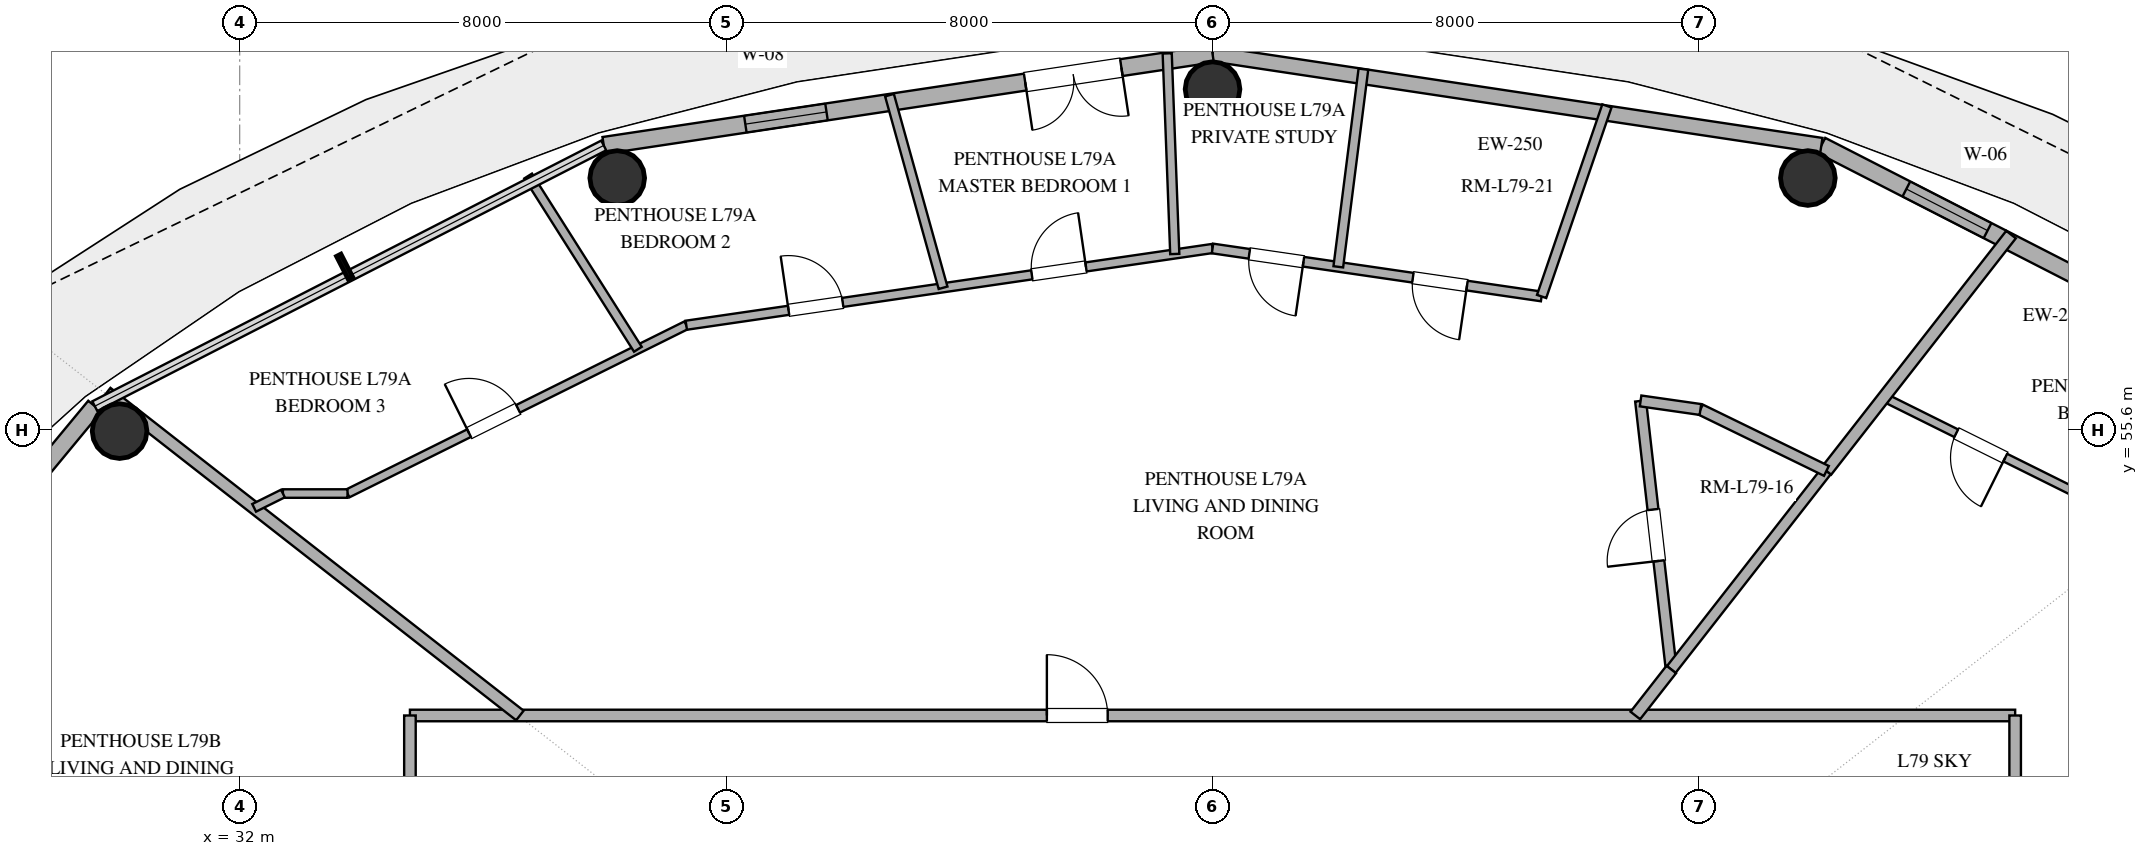
"""IFC4 building model, lengths in metres.
Left out: names, types, materials, properties, quantities, classifications, styles, units other than length and angle.
Written with IfcOpenShell. Run it as: python <this file> out.ifc"""

import sys

from ifc_helpers import new_model, si_unit, direction, frame, frame_2d, origin, origin_2d, place, context, subcontext, project, spatial, rectangle, hollow_circle, extrude, element, fill, save


model = new_model("IFC4")
c1 = context("Model", 3, precision=1e-05, world=origin(), true_north=direction((0.0, 1.0)))
c2 = subcontext(c1, "Body", "Model", "MODEL_VIEW")
j1 = project(units=[si_unit("LENGTHUNIT", "METRE"), si_unit("PLANEANGLEUNIT", "RADIAN")], contexts=[c1])
p1 = place(None, origin())
s1 = spatial("IfcSite", under=j1, at=p1, CompositionType="ELEMENT")
p2 = place(p1, origin())
s2 = spatial("IfcBuilding", under=s1, at=p2, CompositionType="ELEMENT")
p3 = place(p2, frame((0.0, 0.0, 305.4)))
s3 = spatial("IfcBuildingStorey", under=s2, at=p3, CompositionType="ELEMENT", Elevation=305.4)
for number, where, z_axis, x_axis in (
    (1, (57.791, 59.739, 0.0), (0.0, 0.0, 1.0), (1.0, 0.0, 0.0)),
    (2, (48.0, 61.2, 0.0), (0.0, 0.0, 1.0), (1.0, 0.0, 0.0)),
    (3, (38.209, 59.739, 0.0), (0.0, 0.0, 1.0), (1.0, 0.0, 0.0)),
    (4, (30.025, 55.576, 0.0), (0.0, 0.0, 1.0), (1.0, 0.0, 0.0)),
):
    element("IfcColumn", number, at=place(p3, frame(where, z_axis=z_axis, x_axis=x_axis)), inside=s3, PredefinedType="COLUMN", context=c2, shape_type="SweptSolid", body=[
        extrude(hollow_circle(Radius=0.45, WallThickness=0.025, at=origin_2d()), origin(), (0.0, 0.0, 1.0), 3.37),
    ])
p4 = place(p3, frame((66.383, 55.987, 0.0), z_axis=(0.0, 0.0, 1.0), x_axis=(-0.890007394051, 0.455946091699, 0.0)))
e5 = element("IfcWall", 5, at=p4, inside=s3, PredefinedType="SOLIDWALL", context=c2, shape_type="SweptSolid", body=[
    extrude(rectangle(XDim=9.404, YDim=0.28, at=frame_2d((4.702, 0.0))), origin(), (0.0, 0.0, 1.0), 3.37),
])
p5 = place(p4, frame((2.817, 0.0, 0.85)))
e6 = element("IfcOpeningElement", 6, at=p5, cuts=e5, PredefinedType="OPENING", context=c2, shape_type="SweptSolid", body=[
    extrude(rectangle(XDim=1.65, YDim=2.0, at=frame_2d((0.825, 1.0))), frame((0.0, 0.15, 0.0), z_axis=(0.0, -1.0, 0.0), x_axis=(1.0, 0.0, 0.0)), (0.0, 0.0, 1.0), 0.3),
])
p6 = place(p4, frame((6.333, 0.0, 0.85)))
e7 = element("IfcOpeningElement", 7, at=p6, cuts=e5, PredefinedType="OPENING", context=c2, shape_type="SweptSolid", body=[
    extrude(rectangle(XDim=1.5, YDim=2.0, at=frame_2d((0.75, 1.0))), frame((0.0, 0.15, 0.0), z_axis=(0.0, -1.0, 0.0), x_axis=(1.0, 0.0, 0.0)), (0.0, 0.0, 1.0), 0.3),
])
p7 = place(p3, frame((58.013, 60.274, 0.0), z_axis=(0.0, 0.0, 1.0), x_axis=(-0.988882522213, 0.148698881169, 0.0)))
e8 = element("IfcWall", 8, at=p7, inside=s3, PredefinedType="SOLIDWALL", context=c2, shape_type="SweptSolid", body=[
    extrude(rectangle(XDim=10.125, YDim=0.25, at=frame_2d((5.062, 0.0))), origin(), (0.0, 0.0, 1.0), 3.37),
])
p8 = place(p3, frame((48.0, 61.78, 0.0), z_axis=(0.0, 0.0, 1.0), x_axis=(-0.988882522213, -0.148698881169, 0.0)))
e9 = element("IfcWall", 9, at=p8, inside=s3, PredefinedType="SOLIDWALL", context=c2, shape_type="SweptSolid", body=[
    extrude(rectangle(XDim=10.125, YDim=0.28, at=frame_2d((5.062, 0.0))), origin(), (0.0, 0.0, 1.0), 3.37),
])
p9 = place(p8, frame((1.516, 0.0, 0.0)))
e10 = element("IfcOpeningElement", 10, at=p9, cuts=e9, PredefinedType="OPENING", context=c2, shape_type="SweptSolid", body=[
    extrude(rectangle(XDim=1.6, YDim=2.25, at=frame_2d((0.8, 1.125))), frame((0.0, 0.15, 0.0), z_axis=(0.0, -1.0, 0.0), x_axis=(1.0, 0.0, 0.0)), (0.0, 0.0, 1.0), 0.3),
])
p10 = place(p8, frame((6.42, 0.0, 0.85)))
e11 = element("IfcOpeningElement", 11, at=p10, cuts=e9, PredefinedType="OPENING", context=c2, shape_type="SweptSolid", body=[
    extrude(rectangle(XDim=1.35, YDim=1.8, at=frame_2d((0.675, 0.9))), frame((0.0, 0.15, 0.0), z_axis=(0.0, -1.0, 0.0), x_axis=(1.0, 0.0, 0.0)), (0.0, 0.0, 1.0), 0.3),
])
p11 = place(p3, frame((29.617, 55.987, 0.0), z_axis=(0.0, 0.0, 1.0), x_axis=(-0.63761509934, -0.770355103243, 0.0)))
e12 = element("IfcWall", 12, at=p11, inside=s3, PredefinedType="SOLIDWALL", context=c2, shape_type="SweptSolid", body=[
    extrude(rectangle(XDim=8.33, YDim=0.28, at=frame_2d((4.165, 0.0))), origin(), (0.0, 0.0, 1.0), 3.37),
])
p12 = place(p11, frame((2.426, 0.0, 0.85)))
e13 = element("IfcOpeningElement", 13, at=p12, cuts=e12, PredefinedType="OPENING", context=c2, shape_type="SweptSolid", body=[
    extrude(rectangle(XDim=1.2, YDim=1.8, at=frame_2d((0.6, 0.9))), frame((0.0, 0.15, 0.0), z_axis=(0.0, -1.0, 0.0), x_axis=(1.0, 0.0, 0.0)), (0.0, 0.0, 1.0), 0.3),
])
p13 = place(p11, frame((4.596, 0.0, 0.85)))
e14 = element("IfcOpeningElement", 14, at=p13, cuts=e12, PredefinedType="OPENING", context=c2, shape_type="SweptSolid", body=[
    extrude(rectangle(XDim=1.2, YDim=1.8, at=frame_2d((0.6, 0.9))), frame((0.0, 0.15, 0.0), z_axis=(0.0, -1.0, 0.0), x_axis=(1.0, 0.0, 0.0)), (0.0, 0.0, 1.0), 0.3),
])
p14 = place(p3, frame((34.8, 50.9, 0.0), z_axis=(0.0, 0.0, 1.0), x_axis=(1.0, 0.0, 0.0)))
e15 = element("IfcWall", 15, at=p14, inside=s3, PredefinedType="PARTITIONING", context=c2, shape_type="SweptSolid", body=[
    extrude(rectangle(XDim=26.4, YDim=0.19, at=frame_2d((13.2, 0.0))), origin(), (0.0, 0.0, 1.0), 2.73),
])
p15 = place(p14, frame((10.475, 0.0, 0.0)))
e16 = element("IfcOpeningElement", 16, at=p15, cuts=e15, PredefinedType="OPENING", context=c2, shape_type="SweptSolid", body=[
    extrude(rectangle(XDim=1.0, YDim=2.2, at=frame_2d((0.5, 1.1))), frame((0.0, 0.105, 0.0), z_axis=(0.0, -1.0, 0.0), x_axis=(1.0, 0.0, 0.0)), (0.0, 0.0, 1.0), 0.21),
])
p16 = place(p3, frame((61.2, 50.9, 0.0), z_axis=(0.0, 0.0, 1.0), x_axis=(0.0, -1.0, 0.0)))
e17 = element("IfcWall", 17, at=p16, inside=s3, PredefinedType="PARTITIONING", context=c2, shape_type="SweptSolid", body=[
    extrude(rectangle(XDim=16.885, YDim=0.19, at=frame_2d((8.442, 0.0))), origin(), (0.0, 0.0, 1.0), 2.73),
])
p17 = place(p16, frame((7.942, 0.0, 0.0)))
e18 = element("IfcOpeningElement", 18, at=p17, cuts=e17, PredefinedType="OPENING", context=c2, shape_type="SweptSolid", body=[
    extrude(rectangle(XDim=1.0, YDim=2.2, at=frame_2d((0.5, 1.1))), frame((0.0, 0.105, 0.0), z_axis=(0.0, -1.0, 0.0), x_axis=(1.0, 0.0, 0.0)), (0.0, 0.0, 1.0), 0.21),
])
p18 = place(p3, frame((34.8, 37.663, 0.0), z_axis=(0.0, 0.0, 1.0), x_axis=(0.0, 1.0, 0.0)))
e19 = element("IfcWall", 19, at=p18, inside=s3, PredefinedType="PARTITIONING", context=c2, shape_type="SweptSolid", body=[
    extrude(rectangle(XDim=13.237, YDim=0.19, at=frame_2d((6.618, 0.0))), origin(), (0.0, 0.0, 1.0), 2.73),
])
p19 = place(p18, frame((7.46, 0.0, 0.0)))
e20 = element("IfcOpeningElement", 20, at=p19, cuts=e19, PredefinedType="OPENING", context=c2, shape_type="SweptSolid", body=[
    extrude(rectangle(XDim=1.0, YDim=2.2, at=frame_2d((0.5, 1.1))), frame((0.0, 0.105, 0.0), z_axis=(0.0, -1.0, 0.0), x_axis=(1.0, 0.0, 0.0)), (0.0, 0.0, 1.0), 0.21),
])
p20 = place(p3, frame((36.608, 50.9, 0.0), z_axis=(0.0, 0.0, 1.0), x_axis=(-0.78801493083, 0.615656128686, 0.0)))
e21 = element("IfcWall", 21, at=p20, inside=s3, PredefinedType="PARTITIONING", context=c2, shape_type="SweptSolid", body=[
    extrude(rectangle(XDim=8.624, YDim=0.2, at=frame_2d((4.312, 0.0))), origin(), (0.0, 0.0, 1.0), 2.73),
])
p21 = place(p3, frame((33.773, 54.55, 0.0), z_axis=(0.0, 0.0, 1.0), x_axis=(0.895593510097, 0.44487331306, 0.0)))
e22 = element("IfcWall", 22, at=p21, inside=s3, PredefinedType="PARTITIONING", context=c2, shape_type="SweptSolid", body=[
    extrude(rectangle(XDim=6.222, YDim=0.14, at=frame_2d((3.111, 0.0))), origin(), (0.0, 0.0, 1.0), 2.73),
])
p22 = place(p21, frame((2.232, 0.0, 0.0)))
e23 = element("IfcOpeningElement", 23, at=p22, cuts=e22, PredefinedType="OPENING", context=c2, shape_type="SweptSolid", body=[
    extrude(rectangle(XDim=0.9, YDim=2.1, at=frame_2d((0.45, 1.05))), frame((0.0, 0.08, 0.0), z_axis=(0.0, -1.0, 0.0), x_axis=(1.0, 0.0, 0.0)), (0.0, 0.0, 1.0), 0.16),
])
p23 = place(p3, frame((55.544, 51.656, 0.0), z_axis=(0.0, 0.0, 1.0), x_axis=(-0.113517162422, 0.993536035499, 0.0)))
e24 = element("IfcWall", 24, at=p23, inside=s3, PredefinedType="PLUMBINGWALL", context=c2, shape_type="SweptSolid", body=[
    extrude(rectangle(XDim=4.446, YDim=0.18, at=frame_2d((2.223, 0.0))), origin(), (0.0, 0.0, 1.0), 2.73),
])
p24 = place(p23, frame((1.798, 0.0, 0.0)))
e25 = element("IfcOpeningElement", 25, at=p24, cuts=e24, PredefinedType="OPENING", context=c2, shape_type="SweptSolid", body=[
    extrude(rectangle(XDim=0.85, YDim=2.1, at=frame_2d((0.425, 1.05))), frame((0.0, 0.1, 0.0), z_axis=(0.0, -1.0, 0.0), x_axis=(1.0, 0.0, 0.0)), (0.0, 0.0, 1.0), 0.2),
])
p25 = place(p3, frame((39.345, 57.318, 0.0), z_axis=(0.0, 0.0, 1.0), x_axis=(0.989532150642, 0.144312587273, 0.0)))
e26 = element("IfcWall", 26, at=p25, inside=s3, PredefinedType="PARTITIONING", context=c2, shape_type="SweptSolid", body=[
    extrude(rectangle(XDim=8.746, YDim=0.15, at=frame_2d((4.373, 0.0))), origin(), (0.0, 0.0, 1.0), 2.73),
])
p26 = place(p25, frame((1.7, 0.0, 0.0)))
e27 = element("IfcOpeningElement", 27, at=p26, cuts=e26, PredefinedType="OPENING", context=c2, shape_type="SweptSolid", body=[
    extrude(rectangle(XDim=0.9, YDim=2.1, at=frame_2d((0.45, 1.05))), frame((0.0, 0.085, 0.0), z_axis=(0.0, -1.0, 0.0), x_axis=(1.0, 0.0, 0.0)), (0.0, 0.0, 1.0), 0.17),
])
p27 = place(p25, frame((5.743, 0.0, 0.0)))
e28 = element("IfcOpeningElement", 28, at=p27, cuts=e26, PredefinedType="OPENING", context=c2, shape_type="SweptSolid", body=[
    extrude(rectangle(XDim=0.9, YDim=2.1, at=frame_2d((0.45, 1.05))), frame((0.0, 0.085, 0.0), z_axis=(0.0, -1.0, 0.0), x_axis=(1.0, 0.0, 0.0)), (0.0, 0.0, 1.0), 0.17),
])
p28 = place(p3, frame((58.096, 54.922, 0.0), z_axis=(0.0, 0.0, 1.0), x_axis=(-0.615652044057, -0.788018122031, 0.0)))
e29 = element("IfcWall", 29, at=p28, inside=s3, PredefinedType="PLUMBINGWALL", context=c2, shape_type="SweptSolid", body=[
    extrude(rectangle(XDim=4.144, YDim=0.18, at=frame_2d((2.072, 0.0))), origin(), (0.0, 0.0, 1.0), 2.73),
])
p29 = place(p3, frame((62.227, 54.55, 0.0), z_axis=(0.0, 0.0, 1.0), x_axis=(-0.895591084679, 0.444878195739, 0.0)))
e30 = element("IfcWall", 30, at=p29, inside=s3, PredefinedType="PARTITIONING", context=c2, shape_type="SweptSolid", body=[
    extrude(rectangle(XDim=3.557, YDim=0.14, at=frame_2d((1.778, 0.0))), origin(), (0.0, 0.0, 1.0), 2.73),
])
p30 = place(p29, frame((1.328, 0.0, 0.0)))
e31 = element("IfcOpeningElement", 31, at=p30, cuts=e30, PredefinedType="OPENING", context=c2, shape_type="SweptSolid", body=[
    extrude(rectangle(XDim=0.9, YDim=2.1, at=frame_2d((0.45, 1.05))), frame((0.0, 0.08, 0.0), z_axis=(0.0, -1.0, 0.0), x_axis=(1.0, 0.0, 0.0)), (0.0, 0.0, 1.0), 0.16),
])
p31 = place(p3, frame((58.096, 54.922, 0.0), z_axis=(0.0, 0.0, 1.0), x_axis=(0.615676703635, 0.78799885571, 0.0)))
e32 = element("IfcWall", 32, at=p31, inside=s3, PredefinedType="PARTITIONING", context=c2, shape_type="SweptSolid", body=[
    extrude(rectangle(XDim=4.932, YDim=0.2, at=frame_2d((2.466, 0.0))), origin(), (0.0, 0.0, 1.0), 2.73),
])
p32 = place(p3, frame((53.412, 57.791, 0.0), z_axis=(0.0, 0.0, 1.0), x_axis=(-0.989530988967, 0.144320552503, 0.0)))
e33 = element("IfcWall", 33, at=p32, inside=s3, PredefinedType="PLUMBINGWALL", context=c2, shape_type="SweptSolid", body=[
    extrude(rectangle(XDim=5.469, YDim=0.16, at=frame_2d((2.735, 0.0))), origin(), (0.0, 0.0, 1.0), 2.73),
])
p33 = place(p32, frame((1.24, 0.0, 0.0)))
e34 = element("IfcOpeningElement", 34, at=p33, cuts=e33, PredefinedType="OPENING", context=c2, shape_type="SweptSolid", body=[
    extrude(rectangle(XDim=0.9, YDim=2.1, at=frame_2d((0.45, 1.05))), frame((0.0, 0.09, 0.0), z_axis=(0.0, -1.0, 0.0), x_axis=(1.0, 0.0, 0.0)), (0.0, 0.0, 1.0), 0.18),
])
p34 = place(p32, frame((3.958, 0.0, 0.0)))
e35 = element("IfcOpeningElement", 35, at=p34, cuts=e33, PredefinedType="OPENING", context=c2, shape_type="SweptSolid", body=[
    extrude(rectangle(XDim=0.9, YDim=2.1, at=frame_2d((0.45, 1.05))), frame((0.0, 0.09, 0.0), z_axis=(0.0, -1.0, 0.0), x_axis=(1.0, 0.0, 0.0)), (0.0, 0.0, 1.0), 0.18),
])
p35 = place(p3, frame((38.549, 56.922, 0.0), z_axis=(0.0, 0.0, 1.0), x_axis=(-0.535019359821, 0.844839798197, 0.0)))
e36 = element("IfcWall", 36, at=p35, inside=s3, PredefinedType="PARTITIONING", context=c2, shape_type="SweptSolid", body=[
    extrude(rectangle(XDim=3.373, YDim=0.15, at=frame_2d((1.686, 0.0))), origin(), (0.0, 0.0, 1.0), 2.73),
])
p36 = place(p3, frame((54.486, 60.924, 0.0), z_axis=(0.0, 0.0, 1.0), x_axis=(-0.324177330806, -0.945996330961, 0.0)))
e37 = element("IfcWall", 37, at=p36, inside=s3, PredefinedType="PLUMBINGWALL", context=c2, shape_type="SweptSolid", body=[
    extrude(rectangle(XDim=3.312, YDim=0.16, at=frame_2d((1.656, 0.0))), origin(), (0.0, 0.0, 1.0), 2.73),
])
p37 = place(p3, frame((47.379, 58.49, 0.0), z_axis=(0.0, 0.0, 1.0), x_axis=(-0.037643519601, 0.99929123154, 0.0)))
e38 = element("IfcWall", 38, at=p37, inside=s3, PredefinedType="PARTITIONING", context=c2, shape_type="SweptSolid", body=[
    extrude(rectangle(XDim=3.301, YDim=0.15, at=frame_2d((1.651, 0.0))), origin(), (0.0, 0.0, 1.0), 2.73),
])
p38 = place(p3, frame((43.568, 57.934, 0.0), z_axis=(0.0, 0.0, 1.0), x_axis=(-0.267957857452, 0.963430634052, 0.0)))
e39 = element("IfcWall", 39, at=p38, inside=s3, PredefinedType="PARTITIONING", context=c2, shape_type="SweptSolid", body=[
    extrude(rectangle(XDim=3.288, YDim=0.15, at=frame_2d((1.644, 0.0))), origin(), (0.0, 0.0, 1.0), 2.73),
])
p39 = place(p3, frame((50.481, 61.528, 0.0), z_axis=(0.0, 0.0, 1.0), x_axis=(-0.1260156089, -0.992028258828, 0.0)))
e40 = element("IfcWall", 40, at=p39, inside=s3, PredefinedType="PLUMBINGWALL", context=c2, shape_type="SweptSolid", body=[
    extrude(rectangle(XDim=3.276, YDim=0.16, at=frame_2d((1.638, 0.0))), origin(), (0.0, 0.0, 1.0), 2.73),
])
p40 = place(p3, frame((56.024, 55.932, 0.0), z_axis=(0.0, 0.0, 1.0), x_axis=(0.898893612682, -0.438166946585, 0.0)))
e41 = element("IfcWall", 41, at=p40, inside=s3, PredefinedType="PLUMBINGWALL", context=c2, shape_type="SweptSolid", body=[
    extrude(rectangle(XDim=2.305, YDim=0.18, at=frame_2d((1.153, 0.0))), origin(), (0.0, 0.0, 1.0), 2.73),
])
p41 = place(p3, frame((32.711, 54.55, 0.0), z_axis=(0.0, 0.0, 1.0), x_axis=(1.0, 0.0, 0.0)))
e42 = element("IfcWall", 42, at=p41, inside=s3, PredefinedType="PARTITIONING", context=c2, shape_type="SweptSolid", body=[
    extrude(rectangle(XDim=1.062, YDim=0.14, at=frame_2d((0.531, 0.0))), origin(), (0.0, 0.0, 1.0), 2.73),
])
p42 = place(p3, frame((55.04, 56.073, 0.0), z_axis=(0.0, 0.0, 1.0), x_axis=(0.989910163558, -0.141696394039, 0.0)))
e43 = element("IfcWall", 43, at=p42, inside=s3, PredefinedType="PLUMBINGWALL", context=c2, shape_type="SweptSolid", body=[
    extrude(rectangle(XDim=0.994, YDim=0.18, at=frame_2d((0.497, 0.0))), origin(), (0.0, 0.0, 1.0), 2.73),
])
p43 = place(p3, frame((55.544, 51.656, 0.0), z_axis=(0.0, 0.0, 1.0), x_axis=(-0.615752619539, -0.787939535453, 0.0)))
e44 = element("IfcWall", 44, at=p43, inside=s3, PredefinedType="PARTITIONING", context=c2, shape_type="SweptSolid", body=[
    extrude(rectangle(XDim=0.96, YDim=0.2, at=frame_2d((0.48, 0.0))), origin(), (0.0, 0.0, 1.0), 2.73),
])
p44 = place(p3, frame((32.238, 54.315, 0.0), z_axis=(0.0, 0.0, 1.0), x_axis=(0.895257581236, 0.445548945953, 0.0)))
e45 = element("IfcWall", 45, at=p44, inside=s3, PredefinedType="PARTITIONING", context=c2, shape_type="SweptSolid", body=[
    extrude(rectangle(XDim=0.528, YDim=0.14, at=frame_2d((0.264, 0.0))), origin(), (0.0, 0.0, 1.0), 2.73),
])
p45 = place(p6, origin())
e46 = element("IfcWindow", 46, at=p45, inside=s3, PartitioningType="SINGLE_PANEL", PredefinedType="WINDOW", context=c2, shape_type="SweptSolid", body=[
    extrude(rectangle(XDim=1.5, YDim=2.0, at=frame_2d((0.75, 1.0))), frame((0.0, 0.03, 0.0), z_axis=(0.0, -1.0, 0.0), x_axis=(1.0, 0.0, 0.0)), (0.0, 0.0, 1.0), 0.06),
])
fill(e7, e46)
p46 = place(p9, origin())
e47 = element("IfcDoor", 47, at=p46, inside=s3, OperationType="DOUBLE_DOOR_SINGLE_SWING", PredefinedType="DOOR", context=c2, shape_type="SweptSolid", body=[
    extrude(rectangle(XDim=1.6, YDim=2.25, at=frame_2d((0.8, 1.125))), frame((0.0, 0.025, 0.0), z_axis=(0.0, -1.0, 0.0), x_axis=(1.0, 0.0, 0.0)), (0.0, 0.0, 1.0), 0.05),
])
fill(e10, e47)
p47 = place(p10, origin())
e48 = element("IfcWindow", 48, at=p47, inside=s3, PartitioningType="SINGLE_PANEL", PredefinedType="WINDOW", context=c2, shape_type="SweptSolid", body=[
    extrude(rectangle(XDim=1.35, YDim=1.8, at=frame_2d((0.675, 0.9))), frame((0.0, 0.03, 0.0), z_axis=(0.0, -1.0, 0.0), x_axis=(1.0, 0.0, 0.0)), (0.0, 0.0, 1.0), 0.06),
])
fill(e11, e48)
p48 = place(p15, origin())
e49 = element("IfcDoor", 49, at=p48, inside=s3, OperationType="SINGLE_SWING_LEFT", PredefinedType="DOOR", context=c2, shape_type="SweptSolid", body=[
    extrude(rectangle(XDim=1.0, YDim=2.2, at=frame_2d((0.5, 1.1))), frame((0.0, 0.025, 0.0), z_axis=(0.0, -1.0, 0.0), x_axis=(1.0, 0.0, 0.0)), (0.0, 0.0, 1.0), 0.05),
])
fill(e16, e49)
p49 = place(p22, origin())
e50 = element("IfcDoor", 50, at=p49, inside=s3, OperationType="SINGLE_SWING_LEFT", PredefinedType="DOOR", context=c2, shape_type="SweptSolid", body=[
    extrude(rectangle(XDim=0.9, YDim=2.1, at=frame_2d((0.45, 1.05))), frame((0.0, 0.025, 0.0), z_axis=(0.0, -1.0, 0.0), x_axis=(1.0, 0.0, 0.0)), (0.0, 0.0, 1.0), 0.05),
])
fill(e23, e50)
p50 = place(p24, origin())
e51 = element("IfcDoor", 51, at=p50, inside=s3, OperationType="SINGLE_SWING_LEFT", PredefinedType="DOOR", context=c2, shape_type="SweptSolid", body=[
    extrude(rectangle(XDim=0.85, YDim=2.1, at=frame_2d((0.425, 1.05))), frame((0.0, 0.025, 0.0), z_axis=(0.0, -1.0, 0.0), x_axis=(1.0, 0.0, 0.0)), (0.0, 0.0, 1.0), 0.05),
])
fill(e25, e51)
p51 = place(p26, origin())
e52 = element("IfcDoor", 52, at=p51, inside=s3, OperationType="SINGLE_SWING_LEFT", PredefinedType="DOOR", context=c2, shape_type="SweptSolid", body=[
    extrude(rectangle(XDim=0.9, YDim=2.1, at=frame_2d((0.45, 1.05))), frame((0.0, 0.025, 0.0), z_axis=(0.0, -1.0, 0.0), x_axis=(1.0, 0.0, 0.0)), (0.0, 0.0, 1.0), 0.05),
])
fill(e27, e52)
p52 = place(p27, origin())
e53 = element("IfcDoor", 53, at=p52, inside=s3, OperationType="SINGLE_SWING_RIGHT", PredefinedType="DOOR", context=c2, shape_type="SweptSolid", body=[
    extrude(rectangle(XDim=0.9, YDim=2.1, at=frame_2d((0.45, 1.05))), frame((0.0, 0.025, 0.0), z_axis=(0.0, -1.0, 0.0), x_axis=(1.0, 0.0, 0.0)), (0.0, 0.0, 1.0), 0.05),
])
fill(e28, e53)
p53 = place(p30, origin())
e54 = element("IfcDoor", 54, at=p53, inside=s3, OperationType="SINGLE_SWING_LEFT", PredefinedType="DOOR", context=c2, shape_type="SweptSolid", body=[
    extrude(rectangle(XDim=0.9, YDim=2.1, at=frame_2d((0.45, 1.05))), frame((0.0, 0.025, 0.0), z_axis=(0.0, -1.0, 0.0), x_axis=(1.0, 0.0, 0.0)), (0.0, 0.0, 1.0), 0.05),
])
fill(e31, e54)
p54 = place(p33, origin())
e55 = element("IfcDoor", 55, at=p54, inside=s3, OperationType="SINGLE_SWING_LEFT", PredefinedType="DOOR", context=c2, shape_type="SweptSolid", body=[
    extrude(rectangle(XDim=0.9, YDim=2.1, at=frame_2d((0.45, 1.05))), frame((0.0, 0.025, 0.0), z_axis=(0.0, -1.0, 0.0), x_axis=(1.0, 0.0, 0.0)), (0.0, 0.0, 1.0), 0.05),
])
fill(e34, e55)
p55 = place(p34, origin())
e56 = element("IfcDoor", 56, at=p55, inside=s3, OperationType="SINGLE_SWING_LEFT", PredefinedType="DOOR", context=c2, shape_type="SweptSolid", body=[
    extrude(rectangle(XDim=0.9, YDim=2.1, at=frame_2d((0.45, 1.05))), frame((0.0, 0.025, 0.0), z_axis=(0.0, -1.0, 0.0), x_axis=(1.0, 0.0, 0.0)), (0.0, 0.0, 1.0), 0.05),
])
fill(e35, e56)
save(model, sys.argv[1])
